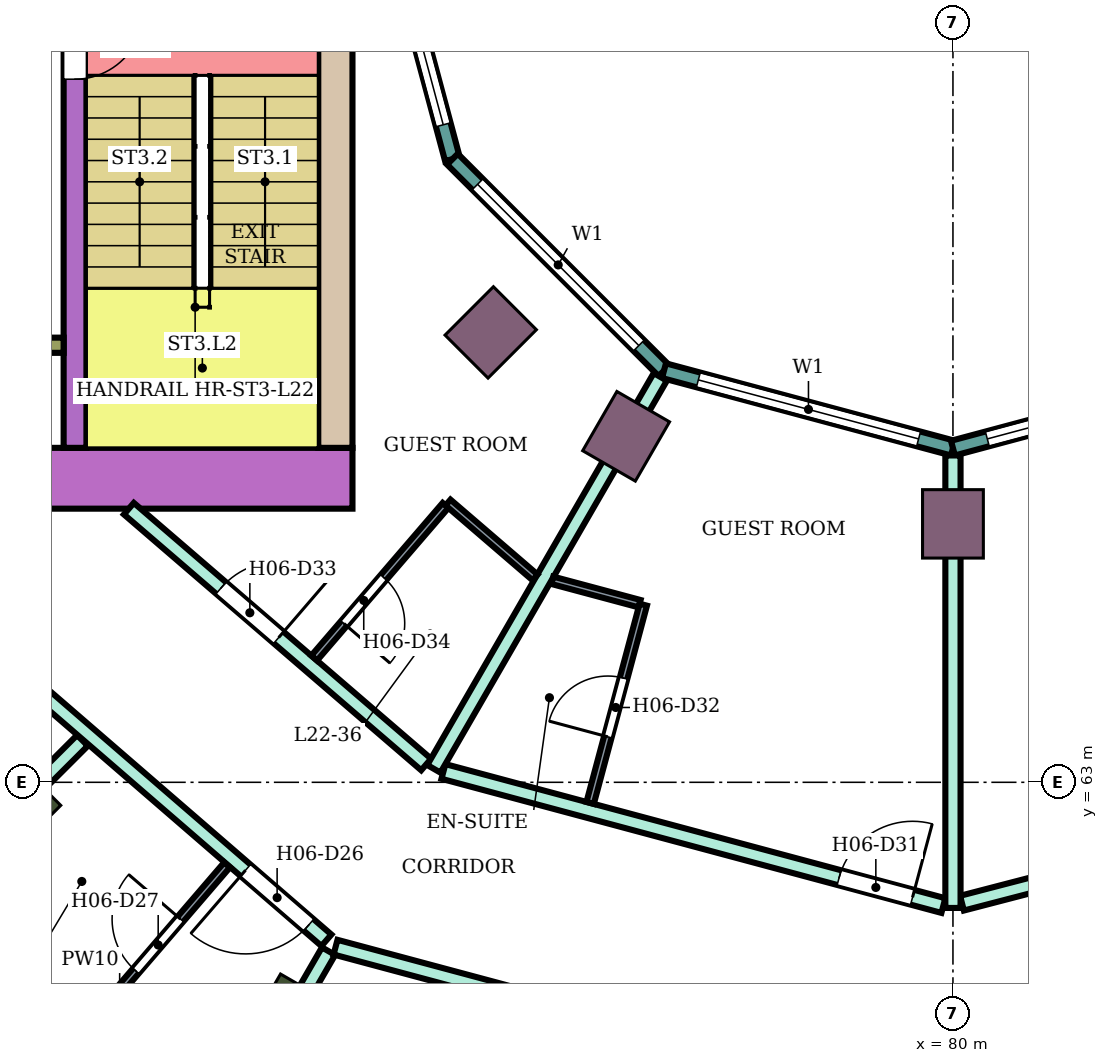
"""IFC4 building model, lengths in metres.
Left out: names, types, materials, properties, quantities, classifications, styles, units other than length and angle.
Written with IfcOpenShell. Run it as: python <this file> out.ifc"""

import sys

from ifc_helpers import new_model, si_unit, direction, frame, frame_2d, origin, origin_2d, place, context, subcontext, project, spatial, rectangle, extrude, element, fill, save


model = new_model("IFC4")
c1 = context("Model", 3, precision=1e-05, world=origin(), true_north=direction((0.0, 1.0)))
c2 = subcontext(c1, "Body", "Model", "MODEL_VIEW")
j1 = project(units=[si_unit("LENGTHUNIT", "METRE"), si_unit("PLANEANGLEUNIT", "RADIAN")], contexts=[c1])
p1 = place(None, origin())
s1 = spatial("IfcSite", under=j1, at=p1, CompositionType="ELEMENT")
p2 = place(p1, origin())
s2 = spatial("IfcBuilding", under=s1, at=p2, CompositionType="ELEMENT")
p3 = place(p2, frame((0.0, 0.0, 97.6)))
s3 = spatial("IfcBuildingStorey", under=s2, at=p3, CompositionType="ELEMENT", Elevation=97.6)
for number, where, z_axis, x_axis in (
    (1, (67.555, 62.555, 0.0), (0.0, 0.0, 1.0), (-0.707, -0.707, 0.0)),
    (2, (71.2, 59.758, 0.0), (0.0, 0.0, 1.0), (-0.5, -0.866, 0.0)),
):
    element("IfcColumn", number, at=place(p3, frame(where, z_axis=z_axis, x_axis=x_axis)), inside=s3, PredefinedType="COLUMN", context=c2, shape_type="SweptSolid", body=[
        extrude(rectangle(XDim=1.2, YDim=0.8, at=origin_2d()), origin(), (0.0, 0.0, 1.0), 3.8),
    ])
for number, where, z_axis, x_axis in (
    (3, (73.919, 68.919, 0.0), (0.0, 0.0, 1.0), (-0.707, -0.707, 0.0)),
    (4, (75.7, 67.552, 0.0), (0.0, 0.0, 1.0), (-0.5, -0.866, 0.0)),
    (5, (80.0, 66.4, 0.0), (0.0, 0.0, 1.0), (0.0, -1.0, 0.0)),
):
    element("IfcColumn", number, at=place(p3, frame(where, z_axis=z_axis, x_axis=x_axis)), inside=s3, PredefinedType="COLUMN", context=c2, shape_type="SweptSolid", body=[
        extrude(rectangle(XDim=0.9, YDim=0.8, at=origin_2d()), origin(), (0.0, 0.0, 1.0), 3.8),
    ])
p4 = place(p3, frame((72.1, 67.0, 0.0), z_axis=(0.0, 0.0, 1.0), x_axis=(-1.0, 0.0, 0.0)))
e6 = element("IfcWall", 6, at=p4, inside=s3, PredefinedType="SHEAR", context=c2, shape_type="SweptSolid", body=[
    extrude(rectangle(XDim=14.7, YDim=0.8, at=frame_2d((7.35, 0.0))), origin(), (0.0, 0.0, 1.0), 3.48),
])
p5 = place(p4, frame((4.2, 0.0, 0.0)))
e7 = element("IfcOpeningElement", 7, at=p5, cuts=e6, PredefinedType="OPENING", context=c2, shape_type="SweptSolid", body=[
    extrude(rectangle(XDim=2.4, YDim=2.4, at=frame_2d((1.2, 1.2))), frame((0.0, 0.41, 0.0), z_axis=(0.0, -1.0, 0.0), x_axis=(1.0, 0.0, 0.0)), (0.0, 0.0, 1.0), 0.82),
])
p6 = place(p3, frame((71.875, 75.0, 0.0), z_axis=(0.0, 0.0, 1.0), x_axis=(0.0, -1.0, 0.0)))
e8 = element("IfcWall", 8, at=p6, inside=s3, PredefinedType="SHEAR", context=c2, shape_type="SweptSolid", body=[
    extrude(rectangle(XDim=7.6, YDim=0.45, at=frame_2d((3.8, 0.0))), origin(), (0.0, 0.0, 1.0), 3.48),
])
p7 = place(p3, frame((68.45, 75.0, 0.0), z_axis=(0.0, 0.0, 1.0), x_axis=(0.0, -1.0, 0.0)))
e9 = element("IfcWall", 9, at=p7, inside=s3, PredefinedType="SHEAR", context=c2, shape_type="SweptSolid", body=[
    extrude(rectangle(XDim=7.6, YDim=0.3, at=frame_2d((3.8, 0.0))), origin(), (0.0, 0.0, 1.0), 3.48),
])
p8 = place(p7, frame((1.85, 0.0, 0.0)))
e10 = element("IfcOpeningElement", 10, at=p8, cuts=e9, PredefinedType="OPENING", context=c2, shape_type="SweptSolid", body=[
    extrude(rectangle(XDim=0.9, YDim=2.1, at=frame_2d((0.45, 1.05))), frame((0.0, 0.16, 0.0), z_axis=(0.0, -1.0, 0.0), x_axis=(1.0, 0.0, 0.0)), (0.0, 0.0, 1.0), 0.32),
])
p9 = place(p3, frame((68.3, 68.75, 0.0), z_axis=(0.0, 0.0, 1.0), x_axis=(-1.0, 0.0, 0.0)))
e11 = element("IfcWall", 11, at=p9, inside=s3, PredefinedType="SHEAR", context=c2, shape_type="SweptSolid", body=[
    extrude(rectangle(XDim=4.65, YDim=0.2, at=frame_2d((2.325, 0.0))), origin(), (0.0, 0.0, 1.0), 3.48),
])
p10 = place(p3, frame((72.396, 75.0, 0.0), z_axis=(0.0, 0.0, 1.0), x_axis=(0.258789828301, -0.965933654434, 0.0)))
e12 = element("IfcWall", 12, at=p10, inside=s3, PredefinedType="NOTDEFINED", context=c2, shape_type="SweptSolid", body=[
    extrude(rectangle(XDim=3.936, YDim=0.2, at=frame_2d((1.968, 0.0))), origin(), (0.0, 0.0, 1.0), 3.8),
])
p11 = place(p10, frame((0.468, 0.0, 0.9)))
e13 = element("IfcOpeningElement", 13, at=p11, cuts=e12, PredefinedType="OPENING", context=c2, shape_type="SweptSolid", body=[
    extrude(rectangle(XDim=3.0, YDim=2.3, at=frame_2d((1.5, 1.15))), frame((0.0, 0.11, 0.0), z_axis=(0.0, -1.0, 0.0), x_axis=(1.0, 0.0, 0.0)), (0.0, 0.0, 1.0), 0.22),
])
p12 = place(p3, frame((73.415, 71.198, 0.0), z_axis=(0.0, 0.0, 1.0), x_axis=(0.707106781187, -0.707106781187, 0.0)))
e14 = element("IfcWall", 14, at=p12, inside=s3, PredefinedType="NOTDEFINED", context=c2, shape_type="SweptSolid", body=[
    extrude(rectangle(XDim=3.936, YDim=0.2, at=frame_2d((1.968, 0.0))), origin(), (0.0, 0.0, 1.0), 3.8),
])
p13 = place(p12, frame((0.468, 0.0, 0.9)))
e15 = element("IfcOpeningElement", 15, at=p13, cuts=e14, PredefinedType="OPENING", context=c2, shape_type="SweptSolid", body=[
    extrude(rectangle(XDim=3.0, YDim=2.3, at=frame_2d((1.5, 1.15))), frame((0.0, 0.11, 0.0), z_axis=(0.0, -1.0, 0.0), x_axis=(1.0, 0.0, 0.0)), (0.0, 0.0, 1.0), 0.22),
])
p14 = place(p3, frame((76.198, 68.415, 0.0), z_axis=(0.0, 0.0, 1.0), x_axis=(0.965933654434, -0.258789828301, 0.0)))
e16 = element("IfcWall", 16, at=p14, inside=s3, PredefinedType="NOTDEFINED", context=c2, shape_type="SweptSolid", body=[
    extrude(rectangle(XDim=3.936, YDim=0.2, at=frame_2d((1.968, 0.0))), origin(), (0.0, 0.0, 1.0), 3.8),
])
p15 = place(p14, frame((0.468, 0.0, 0.9)))
e17 = element("IfcOpeningElement", 17, at=p15, cuts=e16, PredefinedType="OPENING", context=c2, shape_type="SweptSolid", body=[
    extrude(rectangle(XDim=3.0, YDim=2.3, at=frame_2d((1.5, 1.15))), frame((0.0, 0.11, 0.0), z_axis=(0.0, -1.0, 0.0), x_axis=(1.0, 0.0, 0.0)), (0.0, 0.0, 1.0), 0.22),
])
p16 = place(p3, frame((80.0, 67.396, 0.0), z_axis=(0.0, 0.0, 1.0), x_axis=(0.965933654434, 0.258789828301, 0.0)))
e18 = element("IfcWall", 18, at=p16, inside=s3, PredefinedType="NOTDEFINED", context=c2, shape_type="SweptSolid", body=[
    extrude(rectangle(XDim=3.936, YDim=0.2, at=frame_2d((1.968, 0.0))), origin(), (0.0, 0.0, 1.0), 3.8),
])
p17 = place(p16, frame((0.468, 0.0, 0.9)))
e19 = element("IfcOpeningElement", 19, at=p17, cuts=e18, PredefinedType="OPENING", context=c2, shape_type="SweptSolid", body=[
    extrude(rectangle(XDim=3.0, YDim=2.3, at=frame_2d((1.5, 1.15))), frame((0.0, 0.11, 0.0), z_axis=(0.0, -1.0, 0.0), x_axis=(1.0, 0.0, 0.0)), (0.0, 0.0, 1.0), 0.22),
])
p18 = place(p3, frame((63.594, 58.598, 0.0), z_axis=(0.0, 0.0, 1.0), x_axis=(0.707228748718, 0.706984792613, 0.0)))
e20 = element("IfcWall", 20, at=p18, inside=s3, PredefinedType="PARTITIONING", context=c2, shape_type="SweptSolid", body=[
    extrude(rectangle(XDim=7.005, YDim=0.2, at=frame_2d((3.503, 0.0))), origin(), (0.0, 0.0, 1.0), 3.35),
])
p19 = place(p3, frame((67.079, 64.968, 0.0), z_axis=(0.0, 0.0, 1.0), x_axis=(0.756371089567, -0.654142778656, 0.0)))
e21 = element("IfcWall", 21, at=p19, inside=s3, PredefinedType="PARTITIONING", context=c2, shape_type="SweptSolid", body=[
    extrude(rectangle(XDim=6.185, YDim=0.2, at=frame_2d((3.093, 0.0))), origin(), (0.0, 0.0, 1.0), 3.35),
])
p20 = place(p19, frame((4.778, 0.0, 0.0)))
e22 = element("IfcOpeningElement", 22, at=p20, cuts=e21, PredefinedType="OPENING", context=c2, shape_type="SweptSolid", body=[
    extrude(rectangle(XDim=1.1, YDim=2.1, at=frame_2d((0.55, 1.05))), frame((0.0, 0.11, 0.0), z_axis=(0.0, -1.0, 0.0), x_axis=(1.0, 0.0, 0.0)), (0.0, 0.0, 1.0), 0.22),
])
p21 = place(p3, frame((67.096, 52.662, 0.0), z_axis=(0.0, 0.0, 1.0), x_axis=(0.500222922337, 0.865896661253, 0.0)))
e23 = element("IfcWall", 23, at=p21, inside=s3, PredefinedType="PARTITIONING", context=c2, shape_type="SweptSolid", body=[
    extrude(rectangle(XDim=9.374, YDim=0.2, at=frame_2d((4.687, 0.0))), origin(), (0.0, 0.0, 1.0), 3.35),
])
p22 = place(p3, frame((69.158, 66.6, 0.0), z_axis=(0.0, 0.0, 1.0), x_axis=(0.757976058094, -0.652282373943, 0.0)))
e24 = element("IfcWall", 24, at=p22, inside=s3, PredefinedType="PARTITIONING", context=c2, shape_type="SweptSolid", body=[
    extrude(rectangle(XDim=5.16, YDim=0.2, at=frame_2d((2.58, 0.0))), origin(), (0.0, 0.0, 1.0), 3.35),
])
p23 = place(p22, frame((1.6, 0.0, 0.0)))
e25 = element("IfcOpeningElement", 25, at=p23, cuts=e24, PredefinedType="OPENING", context=c2, shape_type="SweptSolid", body=[
    extrude(rectangle(XDim=1.0, YDim=2.1, at=frame_2d((0.5, 1.05))), frame((0.0, 0.11, 0.0), z_axis=(0.0, -1.0, 0.0), x_axis=(1.0, 0.0, 0.0)), (0.0, 0.0, 1.0), 0.22),
])
p24 = place(p3, frame((71.877, 60.831, 0.0), z_axis=(0.0, 0.0, 1.0), x_axis=(0.965905026676, -0.258896657842, 0.0)))
e26 = element("IfcWall", 26, at=p24, inside=s3, PredefinedType="PARTITIONING", context=c2, shape_type="SweptSolid", body=[
    extrude(rectangle(XDim=8.36, YDim=0.2, at=frame_2d((4.18, 0.0))), origin(), (0.0, 0.0, 1.0), 3.35),
])
p25 = place(p24, frame((4.655, 0.0, 0.0)))
e27 = element("IfcOpeningElement", 27, at=p25, cuts=e26, PredefinedType="OPENING", context=c2, shape_type="SweptSolid", body=[
    extrude(rectangle(XDim=1.8, YDim=2.1, at=frame_2d((0.9, 1.05))), frame((0.0, 0.11, 0.0), z_axis=(0.0, -1.0, 0.0), x_axis=(1.0, 0.0, 0.0)), (0.0, 0.0, 1.0), 0.22),
])
p26 = place(p3, frame((73.297, 63.143, 0.0), z_axis=(0.0, 0.0, 1.0), x_axis=(0.965859030528, -0.25906820173, 0.0)))
e28 = element("IfcWall", 28, at=p26, inside=s3, PredefinedType="PARTITIONING", context=c2, shape_type="SweptSolid", body=[
    extrude(rectangle(XDim=6.81, YDim=0.2, at=frame_2d((3.405, 0.0))), origin(), (0.0, 0.0, 1.0), 3.35),
])
p27 = place(p26, frame((5.39, 0.0, 0.0)))
e29 = element("IfcOpeningElement", 29, at=p27, cuts=e28, PredefinedType="OPENING", context=c2, shape_type="SweptSolid", body=[
    extrude(rectangle(XDim=1.0, YDim=2.1, at=frame_2d((0.5, 1.05))), frame((0.0, 0.11, 0.0), z_axis=(0.0, -1.0, 0.0), x_axis=(1.0, 0.0, 0.0)), (0.0, 0.0, 1.0), 0.22),
])
p28 = place(p3, frame((73.171, 63.177, 0.0), z_axis=(0.0, 0.0, 1.0), x_axis=(0.500257106344, 0.865876912472, 0.0)))
e30 = element("IfcWall", 30, at=p28, inside=s3, PredefinedType="PARTITIONING", context=c2, shape_type="SweptSolid", body=[
    extrude(rectangle(XDim=5.955, YDim=0.2, at=frame_2d((2.978, 0.0))), origin(), (0.0, 0.0, 1.0), 3.35),
])
p29 = place(p3, frame((80.119, 61.41, 0.0), z_axis=(0.0, 0.0, 1.0), x_axis=(0.967823361235, 0.251630565408, 0.0)))
e31 = element("IfcWall", 31, at=p29, inside=s3, PredefinedType="PARTITIONING", context=c2, shape_type="SweptSolid", body=[
    extrude(rectangle(XDim=6.958, YDim=0.2, at=frame_2d((3.479, 0.0))), origin(), (0.0, 0.0, 1.0), 3.35),
])
p30 = place(p29, frame((2.529, 0.0, 0.0)))
e32 = element("IfcOpeningElement", 32, at=p30, cuts=e31, PredefinedType="OPENING", context=c2, shape_type="SweptSolid", body=[
    extrude(rectangle(XDim=1.8, YDim=2.1, at=frame_2d((0.9, 1.05))), frame((0.0, 0.11, 0.0), z_axis=(0.0, -1.0, 0.0), x_axis=(1.0, 0.0, 0.0)), (0.0, 0.0, 1.0), 0.22),
])
p31 = place(p3, frame((80.0, 58.655, 0.0), z_axis=(0.0, 0.0, 1.0), x_axis=(0.965967338894, 0.258664068224, 0.0)))
e33 = element("IfcWall", 33, at=p31, inside=s3, PredefinedType="PARTITIONING", context=c2, shape_type="SweptSolid", body=[
    extrude(rectangle(XDim=8.36, YDim=0.2, at=frame_2d((4.18, 0.0))), origin(), (0.0, 0.0, 1.0), 3.35),
])
p32 = place(p31, frame((6.86, 0.0, 0.0)))
e34 = element("IfcOpeningElement", 34, at=p32, cuts=e33, PredefinedType="OPENING", context=c2, shape_type="SweptSolid", body=[
    extrude(rectangle(XDim=1.0, YDim=2.1, at=frame_2d((0.5, 1.05))), frame((0.0, 0.11, 0.0), z_axis=(0.0, -1.0, 0.0), x_axis=(1.0, 0.0, 0.0)), (0.0, 0.0, 1.0), 0.22),
])
p33 = place(p3, frame((80.0, 61.347, 0.0), z_axis=(0.0, 0.0, 1.0), x_axis=(0.0, 1.0, 0.0)))
e35 = element("IfcWall", 35, at=p33, inside=s3, PredefinedType="PARTITIONING", context=c2, shape_type="SweptSolid", body=[
    extrude(rectangle(XDim=5.953, YDim=0.2, at=frame_2d((2.977, 0.0))), origin(), (0.0, 0.0, 1.0), 3.35),
])
p34 = place(p3, frame((66.576, 61.435, 0.0), z_axis=(0.0, 0.0, 1.0), x_axis=(0.757970550281, -0.652288774169, 0.0)))
e36 = element("IfcWall", 36, at=p34, inside=s3, PredefinedType="PARTITIONING", context=c2, shape_type="SweptSolid", body=[
    extrude(rectangle(XDim=2.576, YDim=0.1, at=frame_2d((1.288, 0.0))), origin(), (0.0, 0.0, 1.0), 3.35),
])
p35 = place(p3, frame((68.566, 59.722, 0.0), z_axis=(0.0, 0.0, 1.0), x_axis=(0.65193146671, 0.758277892803, 0.0)))
e37 = element("IfcWall", 37, at=p35, inside=s3, PredefinedType="PARTITIONING", context=c2, shape_type="SweptSolid", body=[
    extrude(rectangle(XDim=2.89, YDim=0.1, at=frame_2d((1.445, 0.0))), origin(), (0.0, 0.0, 1.0), 3.35),
])
p36 = place(p35, frame((1.05, 0.0, 0.0)))
e38 = element("IfcOpeningElement", 38, at=p36, cuts=e37, PredefinedType="OPENING", context=c2, shape_type="SweptSolid", body=[
    extrude(rectangle(XDim=0.9, YDim=2.1, at=frame_2d((0.45, 1.05))), frame((0.0, 0.06, 0.0), z_axis=(0.0, -1.0, 0.0), x_axis=(1.0, 0.0, 0.0)), (0.0, 0.0, 1.0), 0.12),
])
p37 = place(p3, frame((71.596, 64.635, 0.0), z_axis=(0.0, 0.0, 1.0), x_axis=(0.652285007511, 0.757973791748, 0.0)))
e39 = element("IfcWall", 39, at=p37, inside=s3, PredefinedType="PARTITIONING", context=c2, shape_type="SweptSolid", body=[
    extrude(rectangle(XDim=2.65, YDim=0.1, at=frame_2d((1.325, 0.0))), origin(), (0.0, 0.0, 1.0), 3.35),
])
p38 = place(p37, frame((0.6, 0.0, 0.0)))
e40 = element("IfcOpeningElement", 40, at=p38, cuts=e39, PredefinedType="OPENING", context=c2, shape_type="SweptSolid", body=[
    extrude(rectangle(XDim=0.8, YDim=2.1, at=frame_2d((0.4, 1.05))), frame((0.0, 0.06, 0.0), z_axis=(0.0, -1.0, 0.0), x_axis=(1.0, 0.0, 0.0)), (0.0, 0.0, 1.0), 0.12),
])
p39 = place(p3, frame((73.357, 66.681, 0.0), z_axis=(0.0, 0.0, 1.0), x_axis=(0.758263469747, -0.651948242154, 0.0)))
e41 = element("IfcWall", 41, at=p39, inside=s3, PredefinedType="PARTITIONING", context=c2, shape_type="SweptSolid", body=[
    extrude(rectangle(XDim=1.511, YDim=0.1, at=frame_2d((0.755, 0.0))), origin(), (0.0, 0.0, 1.0), 3.35),
])
p40 = place(p3, frame((74.729, 65.657, 0.0), z_axis=(0.0, 0.0, 1.0), x_axis=(0.965948051503, -0.258736085224, 0.0)))
e42 = element("IfcWall", 42, at=p40, inside=s3, PredefinedType="PARTITIONING", context=c2, shape_type="SweptSolid", body=[
    extrude(rectangle(XDim=1.189, YDim=0.1, at=frame_2d((0.594, 0.0))), origin(), (0.0, 0.0, 1.0), 3.35),
])
p41 = place(p3, frame((75.227, 62.729, 0.0), z_axis=(0.0, 0.0, 1.0), x_axis=(0.258945475746, 0.965891940432, 0.0)))
e43 = element("IfcWall", 43, at=p41, inside=s3, PredefinedType="PARTITIONING", context=c2, shape_type="SweptSolid", body=[
    extrude(rectangle(XDim=2.7, YDim=0.1, at=frame_2d((1.35, 0.0))), origin(), (0.0, 0.0, 1.0), 3.35),
])
p42 = place(p41, frame((0.9, 0.0, 0.0)))
e44 = element("IfcOpeningElement", 44, at=p42, cuts=e43, PredefinedType="OPENING", context=c2, shape_type="SweptSolid", body=[
    extrude(rectangle(XDim=0.8, YDim=2.1, at=frame_2d((0.4, 1.05))), frame((0.0, 0.06, 0.0), z_axis=(0.0, -1.0, 0.0), x_axis=(1.0, 0.0, 0.0)), (0.0, 0.0, 1.0), 0.12),
])
p43 = place(p11, origin())
e45 = element("IfcWindow", 45, at=p43, inside=s3, PartitioningType="SINGLE_PANEL", PredefinedType="WINDOW", context=c2, shape_type="SweptSolid", body=[
    extrude(rectangle(XDim=3.0, YDim=2.3, at=frame_2d((1.5, 1.15))), frame((0.0, 0.03, 0.0), z_axis=(0.0, -1.0, 0.0), x_axis=(1.0, 0.0, 0.0)), (0.0, 0.0, 1.0), 0.06),
])
fill(e13, e45)
p44 = place(p13, origin())
e46 = element("IfcWindow", 46, at=p44, inside=s3, PartitioningType="SINGLE_PANEL", PredefinedType="WINDOW", context=c2, shape_type="SweptSolid", body=[
    extrude(rectangle(XDim=3.0, YDim=2.3, at=frame_2d((1.5, 1.15))), frame((0.0, 0.03, 0.0), z_axis=(0.0, -1.0, 0.0), x_axis=(1.0, 0.0, 0.0)), (0.0, 0.0, 1.0), 0.06),
])
fill(e15, e46)
p45 = place(p15, origin())
e47 = element("IfcWindow", 47, at=p45, inside=s3, PartitioningType="SINGLE_PANEL", PredefinedType="WINDOW", context=c2, shape_type="SweptSolid", body=[
    extrude(rectangle(XDim=3.0, YDim=2.3, at=frame_2d((1.5, 1.15))), frame((0.0, 0.03, 0.0), z_axis=(0.0, -1.0, 0.0), x_axis=(1.0, 0.0, 0.0)), (0.0, 0.0, 1.0), 0.06),
])
fill(e17, e47)
p46 = place(p17, origin())
e48 = element("IfcWindow", 48, at=p46, inside=s3, PartitioningType="SINGLE_PANEL", PredefinedType="WINDOW", context=c2, shape_type="SweptSolid", body=[
    extrude(rectangle(XDim=3.0, YDim=2.3, at=frame_2d((1.5, 1.15))), frame((0.0, 0.03, 0.0), z_axis=(0.0, -1.0, 0.0), x_axis=(1.0, 0.0, 0.0)), (0.0, 0.0, 1.0), 0.06),
])
fill(e19, e48)
p47 = place(p20, frame((1.1, 0.0, 0.0), z_axis=(0.0, 0.0, 1.0), x_axis=(-1.0, 0.0, 0.0)))
e49 = element("IfcDoor", 49, at=p47, inside=s3, OperationType="SINGLE_SWING_RIGHT", PredefinedType="DOOR", context=c2, shape_type="SweptSolid", body=[
    extrude(rectangle(XDim=1.1, YDim=2.1, at=frame_2d((0.55, 1.05))), frame((0.0, 0.025, 0.0), z_axis=(0.0, -1.0, 0.0), x_axis=(1.0, 0.0, 0.0)), (0.0, 0.0, 1.0), 0.05),
])
fill(e22, e49)
p48 = place(p36, origin())
e50 = element("IfcDoor", 50, at=p48, inside=s3, OperationType="SINGLE_SWING_RIGHT", PredefinedType="DOOR", context=c2, shape_type="SweptSolid", body=[
    extrude(rectangle(XDim=0.9, YDim=2.1, at=frame_2d((0.45, 1.05))), frame((0.0, 0.025, 0.0), z_axis=(0.0, -1.0, 0.0), x_axis=(1.0, 0.0, 0.0)), (0.0, 0.0, 1.0), 0.05),
])
fill(e38, e50)
p49 = place(p27, origin())
e51 = element("IfcDoor", 51, at=p49, inside=s3, OperationType="SINGLE_SWING_RIGHT", PredefinedType="DOOR", context=c2, shape_type="SweptSolid", body=[
    extrude(rectangle(XDim=1.0, YDim=2.1, at=frame_2d((0.5, 1.05))), frame((0.0, 0.025, 0.0), z_axis=(0.0, -1.0, 0.0), x_axis=(1.0, 0.0, 0.0)), (0.0, 0.0, 1.0), 0.05),
])
fill(e29, e51)
p50 = place(p42, origin())
e52 = element("IfcDoor", 52, at=p50, inside=s3, OperationType="SINGLE_SWING_LEFT", PredefinedType="DOOR", context=c2, shape_type="SweptSolid", body=[
    extrude(rectangle(XDim=0.8, YDim=2.1, at=frame_2d((0.4, 1.05))), frame((0.0, 0.025, 0.0), z_axis=(0.0, -1.0, 0.0), x_axis=(1.0, 0.0, 0.0)), (0.0, 0.0, 1.0), 0.05),
])
fill(e44, e52)
p51 = place(p23, origin())
e53 = element("IfcDoor", 53, at=p51, inside=s3, OperationType="SINGLE_SWING_RIGHT", PredefinedType="DOOR", context=c2, shape_type="SweptSolid", body=[
    extrude(rectangle(XDim=1.0, YDim=2.1, at=frame_2d((0.5, 1.05))), frame((0.0, 0.025, 0.0), z_axis=(0.0, -1.0, 0.0), x_axis=(1.0, 0.0, 0.0)), (0.0, 0.0, 1.0), 0.05),
])
fill(e25, e53)
p52 = place(p38, frame((0.8, 0.0, 0.0), z_axis=(0.0, 0.0, 1.0), x_axis=(-1.0, 0.0, 0.0)))
e54 = element("IfcDoor", 54, at=p52, inside=s3, OperationType="SINGLE_SWING_RIGHT", PredefinedType="DOOR", context=c2, shape_type="SweptSolid", body=[
    extrude(rectangle(XDim=0.8, YDim=2.1, at=frame_2d((0.4, 1.05))), frame((0.0, 0.025, 0.0), z_axis=(0.0, -1.0, 0.0), x_axis=(1.0, 0.0, 0.0)), (0.0, 0.0, 1.0), 0.05),
])
fill(e40, e54)
p53 = place(p8, origin())
e55 = element("IfcDoor", 55, at=p53, inside=s3, OperationType="SINGLE_SWING_LEFT", PredefinedType="DOOR", context=c2, shape_type="SweptSolid", body=[
    extrude(rectangle(XDim=0.9, YDim=2.1, at=frame_2d((0.45, 1.05))), frame((0.0, 0.025, 0.0), z_axis=(0.0, -1.0, 0.0), x_axis=(1.0, 0.0, 0.0)), (0.0, 0.0, 1.0), 0.05),
])
fill(e10, e55)
save(model, sys.argv[1])
